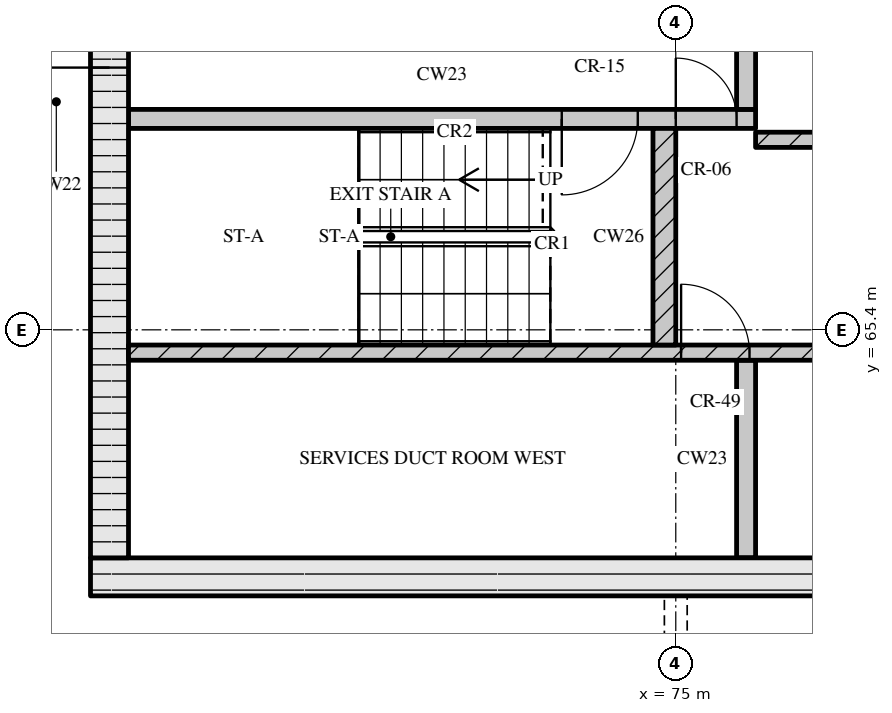
"""IFC4 building model, lengths in metres.
Left out: names, types, materials, properties, quantities, classifications, styles, units other than length and angle.
Written with IfcOpenShell. Run it as: python <this file> out.ifc"""

import sys

from ifc_helpers import new_model, si_unit, direction, frame, frame_2d, origin, place, context, subcontext, project, spatial, rectangle, extrude, element, fill, save


model = new_model("IFC4")
c1 = context("Model", 3, precision=1e-05, world=origin(), true_north=direction((0.0, 1.0)))
c2 = subcontext(c1, "Body", "Model", "MODEL_VIEW")
j1 = project(units=[si_unit("LENGTHUNIT", "METRE"), si_unit("PLANEANGLEUNIT", "RADIAN")], contexts=[c1])
p1 = place(None, origin())
s1 = spatial("IfcSite", under=j1, at=p1, CompositionType="ELEMENT")
p2 = place(p1, origin())
s2 = spatial("IfcBuilding", under=s1, at=p2, CompositionType="ELEMENT")
p3 = place(p2, frame((0.0, 0.0, 263.55)))
s3 = spatial("IfcBuildingStorey", under=s2, at=p3, CompositionType="ELEMENT", Elevation=263.55)
p4 = place(p3, frame((67.3, 62.15, 0.0), z_axis=(0.0, 0.0, 1.0), x_axis=(1.0, 0.0, 0.0)))
e1 = element("IfcWall", 1, at=p4, inside=s3, PredefinedType="SOLIDWALL", context=c2, shape_type="SweptSolid", body=[
    extrude(rectangle(XDim=40.6, YDim=0.5, at=frame_2d((20.3, 0.0))), origin(), (0.0, 0.0, 1.0), 3.32),
])
p5 = place(p4, frame((20.65, 0.0, 0.0)))
e2 = element("IfcOpeningElement", 2, at=p5, cuts=e1, PredefinedType="OPENING", context=c2, shape_type="SweptSolid", body=[
    extrude(rectangle(XDim=1.8, YDim=2.1, at=frame_2d((0.9, 1.05))), frame((0.0, 0.26, 0.0), z_axis=(0.0, -1.0, 0.0), x_axis=(1.0, 0.0, 0.0)), (0.0, 0.0, 1.0), 0.52),
])
p6 = place(p3, frame((67.55, 62.4, 0.0), z_axis=(0.0, 0.0, 1.0), x_axis=(0.0, 1.0, 0.0)))
e3 = element("IfcWall", 3, at=p6, inside=s3, PredefinedType="SOLIDWALL", context=c2, shape_type="SweptSolid", body=[
    extrude(rectangle(XDim=12.0, YDim=0.5, at=frame_2d((6.0, 0.0))), origin(), (0.0, 0.0, 1.0), 3.32),
])
p7 = place(p6, frame((6.45, 0.0, 0.0)))
e4 = element("IfcOpeningElement", 4, at=p7, cuts=e3, PredefinedType="OPENING", context=c2, shape_type="SweptSolid", body=[
    extrude(rectangle(XDim=1.2, YDim=2.1, at=frame_2d((0.6, 1.05))), frame((0.0, 0.26, 0.0), z_axis=(0.0, -1.0, 0.0), x_axis=(1.0, 0.0, 0.0)), (0.0, 0.0, 1.0), 0.52),
])
p8 = place(p3, frame((75.925, 62.4, 0.0), z_axis=(0.0, 0.0, 1.0), x_axis=(0.0, 1.0, 0.0)))
e5 = element("IfcWall", 5, at=p8, inside=s3, PredefinedType="SOLIDWALL", context=c2, shape_type="SweptSolid", body=[
    extrude(rectangle(XDim=2.6, YDim=0.25, at=frame_2d((1.3, 0.0))), origin(), (0.0, 0.0, 1.0), 3.32),
])
p9 = place(p3, frame((67.8, 65.1, 0.0), z_axis=(0.0, 0.0, 1.0), x_axis=(1.0, 0.0, 0.0)))
e6 = element("IfcWall", 6, at=p9, inside=s3, PredefinedType="SOLIDWALL", context=c2, shape_type="SweptSolid", body=[
    extrude(rectangle(XDim=18.5, YDim=0.2, at=frame_2d((9.25, 0.0))), origin(), (0.0, 0.0, 1.0), 3.32),
])
p10 = place(p9, frame((7.27, 0.0, 0.0)))
e7 = element("IfcOpeningElement", 7, at=p10, cuts=e6, PredefinedType="OPENING", context=c2, shape_type="SweptSolid", body=[
    extrude(rectangle(XDim=0.9, YDim=2.1, at=frame_2d((0.45, 1.05))), frame((0.0, 0.11, 0.0), z_axis=(0.0, -1.0, 0.0), x_axis=(1.0, 0.0, 0.0)), (0.0, 0.0, 1.0), 0.22),
])
p11 = place(p9, frame((11.45, 0.0, 0.0)))
e8 = element("IfcOpeningElement", 8, at=p11, cuts=e6, PredefinedType="OPENING", context=c2, shape_type="SweptSolid", body=[
    extrude(rectangle(XDim=0.9, YDim=2.1, at=frame_2d((0.45, 1.05))), frame((0.0, 0.11, 0.0), z_axis=(0.0, -1.0, 0.0), x_axis=(1.0, 0.0, 0.0)), (0.0, 0.0, 1.0), 0.22),
])
p12 = place(p9, frame((16.7, 0.0, 0.0)))
e9 = element("IfcOpeningElement", 9, at=p12, cuts=e6, PredefinedType="OPENING", context=c2, shape_type="SweptSolid", body=[
    extrude(rectangle(XDim=0.9, YDim=2.1, at=frame_2d((0.45, 1.05))), frame((0.0, 0.11, 0.0), z_axis=(0.0, -1.0, 0.0), x_axis=(1.0, 0.0, 0.0)), (0.0, 0.0, 1.0), 0.22),
])
p13 = place(p3, frame((74.85, 65.2, 0.0), z_axis=(0.0, 0.0, 1.0), x_axis=(0.0, 1.0, 0.0)))
e10 = element("IfcWall", 10, at=p13, inside=s3, PredefinedType="SOLIDWALL", context=c2, shape_type="SweptSolid", body=[
    extrude(rectangle(XDim=2.85, YDim=0.3, at=frame_2d((1.425, 0.0))), origin(), (0.0, 0.0, 1.0), 3.32),
])
p14 = place(p3, frame((76.05, 67.9, 0.0), z_axis=(0.0, 0.0, 1.0), x_axis=(1.0, 0.0, 0.0)))
e11 = element("IfcWall", 11, at=p14, inside=s3, PredefinedType="SOLIDWALL", context=c2, shape_type="SweptSolid", body=[
    extrude(rectangle(XDim=23.1, YDim=0.2, at=frame_2d((11.55, 0.0))), origin(), (0.0, 0.0, 1.0), 3.32),
])
p15 = place(p14, frame((1.4, 0.0, 0.0)))
e12 = element("IfcOpeningElement", 12, at=p15, cuts=e11, PredefinedType="OPENING", context=c2, shape_type="SweptSolid", body=[
    extrude(rectangle(XDim=0.9, YDim=2.1, at=frame_2d((0.45, 1.05))), frame((0.0, 0.11, 0.0), z_axis=(0.0, -1.0, 0.0), x_axis=(1.0, 0.0, 0.0)), (0.0, 0.0, 1.0), 0.22),
])
p16 = place(p14, frame((5.11, 0.0, 0.0)))
e13 = element("IfcOpeningElement", 13, at=p16, cuts=e11, PredefinedType="OPENING", context=c2, shape_type="SweptSolid", body=[
    extrude(rectangle(XDim=0.9, YDim=2.1, at=frame_2d((0.45, 1.05))), frame((0.0, 0.11, 0.0), z_axis=(0.0, -1.0, 0.0), x_axis=(1.0, 0.0, 0.0)), (0.0, 0.0, 1.0), 0.22),
])
p17 = place(p14, frame((8.45, 0.0, 0.0)))
e14 = element("IfcOpeningElement", 14, at=p17, cuts=e11, PredefinedType="OPENING", context=c2, shape_type="SweptSolid", body=[
    extrude(rectangle(XDim=0.9, YDim=2.1, at=frame_2d((0.45, 1.05))), frame((0.0, 0.11, 0.0), z_axis=(0.0, -1.0, 0.0), x_axis=(1.0, 0.0, 0.0)), (0.0, 0.0, 1.0), 0.22),
])
p18 = place(p14, frame((10.91, 0.0, 0.0)))
e15 = element("IfcOpeningElement", 15, at=p18, cuts=e11, PredefinedType="OPENING", context=c2, shape_type="SweptSolid", body=[
    extrude(rectangle(XDim=0.9, YDim=2.1, at=frame_2d((0.45, 1.05))), frame((0.0, 0.11, 0.0), z_axis=(0.0, -1.0, 0.0), x_axis=(1.0, 0.0, 0.0)), (0.0, 0.0, 1.0), 0.22),
])
p19 = place(p14, frame((13.55, 0.0, 0.0)))
e16 = element("IfcOpeningElement", 16, at=p19, cuts=e11, PredefinedType="OPENING", context=c2, shape_type="SweptSolid", body=[
    extrude(rectangle(XDim=1.0, YDim=2.1, at=frame_2d((0.5, 1.05))), frame((0.0, 0.11, 0.0), z_axis=(0.0, -1.0, 0.0), x_axis=(1.0, 0.0, 0.0)), (0.0, 0.0, 1.0), 0.22),
])
p20 = place(p14, frame((16.2, 0.0, 0.0)))
e17 = element("IfcOpeningElement", 17, at=p20, cuts=e11, PredefinedType="OPENING", context=c2, shape_type="SweptSolid", body=[
    extrude(rectangle(XDim=1.1, YDim=2.1, at=frame_2d((0.55, 1.05))), frame((0.0, 0.11, 0.0), z_axis=(0.0, -1.0, 0.0), x_axis=(1.0, 0.0, 0.0)), (0.0, 0.0, 1.0), 0.22),
])
p21 = place(p14, frame((18.7, 0.0, 0.0)))
e18 = element("IfcOpeningElement", 18, at=p21, cuts=e11, PredefinedType="OPENING", context=c2, shape_type="SweptSolid", body=[
    extrude(rectangle(XDim=1.1, YDim=2.1, at=frame_2d((0.55, 1.05))), frame((0.0, 0.11, 0.0), z_axis=(0.0, -1.0, 0.0), x_axis=(1.0, 0.0, 0.0)), (0.0, 0.0, 1.0), 0.22),
])
p22 = place(p14, frame((21.2, 0.0, 0.0)))
e19 = element("IfcOpeningElement", 19, at=p22, cuts=e11, PredefinedType="OPENING", context=c2, shape_type="SweptSolid", body=[
    extrude(rectangle(XDim=1.1, YDim=2.1, at=frame_2d((0.55, 1.05))), frame((0.0, 0.11, 0.0), z_axis=(0.0, -1.0, 0.0), x_axis=(1.0, 0.0, 0.0)), (0.0, 0.0, 1.0), 0.22),
])
p23 = place(p3, frame((67.8, 68.175, 0.0), z_axis=(0.0, 0.0, 1.0), x_axis=(1.0, 0.0, 0.0)))
e20 = element("IfcWall", 20, at=p23, inside=s3, PredefinedType="SOLIDWALL", context=c2, shape_type="SweptSolid", body=[
    extrude(rectangle(XDim=8.25, YDim=0.25, at=frame_2d((4.125, 0.0))), origin(), (0.0, 0.0, 1.0), 3.32),
])
p24 = place(p23, frame((5.7, 0.0, 0.0)))
e21 = element("IfcOpeningElement", 21, at=p24, cuts=e20, PredefinedType="OPENING", context=c2, shape_type="SweptSolid", body=[
    extrude(rectangle(XDim=1.0, YDim=2.1, at=frame_2d((0.5, 1.05))), frame((0.0, 0.135, 0.0), z_axis=(0.0, -1.0, 0.0), x_axis=(1.0, 0.0, 0.0)), (0.0, 0.0, 1.0), 0.27),
])
p25 = place(p23, frame((7.2, 0.0, 0.0)))
e22 = element("IfcOpeningElement", 22, at=p25, cuts=e20, PredefinedType="OPENING", context=c2, shape_type="SweptSolid", body=[
    extrude(rectangle(XDim=0.8, YDim=2.1, at=frame_2d((0.4, 1.05))), frame((0.0, 0.135, 0.0), z_axis=(0.0, -1.0, 0.0), x_axis=(1.0, 0.0, 0.0)), (0.0, 0.0, 1.0), 0.27),
])
p26 = place(p3, frame((75.925, 68.3, 0.0), z_axis=(0.0, 0.0, 1.0), x_axis=(0.0, 1.0, 0.0)))
e23 = element("IfcWall", 23, at=p26, inside=s3, PredefinedType="SOLIDWALL", context=c2, shape_type="SweptSolid", body=[
    extrude(rectangle(XDim=2.3, YDim=0.25, at=frame_2d((1.15, 0.0))), origin(), (0.0, 0.0, 1.0), 3.32),
])
p27 = place(p10, origin())
e24 = element("IfcDoor", 24, at=p27, inside=s3, OperationType="SINGLE_SWING_LEFT", PredefinedType="DOOR", context=c2, shape_type="SweptSolid", body=[
    extrude(rectangle(XDim=0.9, YDim=2.1, at=frame_2d((0.45, 1.05))), frame((0.0, 0.025, 0.0), z_axis=(0.0, -1.0, 0.0), x_axis=(1.0, 0.0, 0.0)), (0.0, 0.0, 1.0), 0.05),
])
fill(e7, e24)
p28 = place(p24, origin())
e25 = element("IfcDoor", 25, at=p28, inside=s3, OperationType="SINGLE_SWING_RIGHT", PredefinedType="DOOR", context=c2, shape_type="SweptSolid", body=[
    extrude(rectangle(XDim=1.0, YDim=2.1, at=frame_2d((0.5, 1.05))), frame((0.0, 0.025, 0.0), z_axis=(0.0, -1.0, 0.0), x_axis=(1.0, 0.0, 0.0)), (0.0, 0.0, 1.0), 0.05),
])
fill(e21, e25)
p29 = place(p25, origin())
e26 = element("IfcDoor", 26, at=p29, inside=s3, OperationType="SINGLE_SWING_LEFT", PredefinedType="DOOR", context=c2, shape_type="SweptSolid", body=[
    extrude(rectangle(XDim=0.8, YDim=2.1, at=frame_2d((0.4, 1.05))), frame((0.0, 0.025, 0.0), z_axis=(0.0, -1.0, 0.0), x_axis=(1.0, 0.0, 0.0)), (0.0, 0.0, 1.0), 0.05),
])
fill(e22, e26)
p30 = place(p7, origin())
e27 = element("IfcDoor", 27, at=p30, inside=s3, OperationType="SINGLE_SWING_LEFT", PredefinedType="DOOR", context=c2, shape_type="SweptSolid", body=[
    extrude(rectangle(XDim=1.2, YDim=2.1, at=frame_2d((0.6, 1.05))), frame((0.0, 0.025, 0.0), z_axis=(0.0, -1.0, 0.0), x_axis=(1.0, 0.0, 0.0)), (0.0, 0.0, 1.0), 0.05),
])
fill(e4, e27)
save(model, sys.argv[1])
